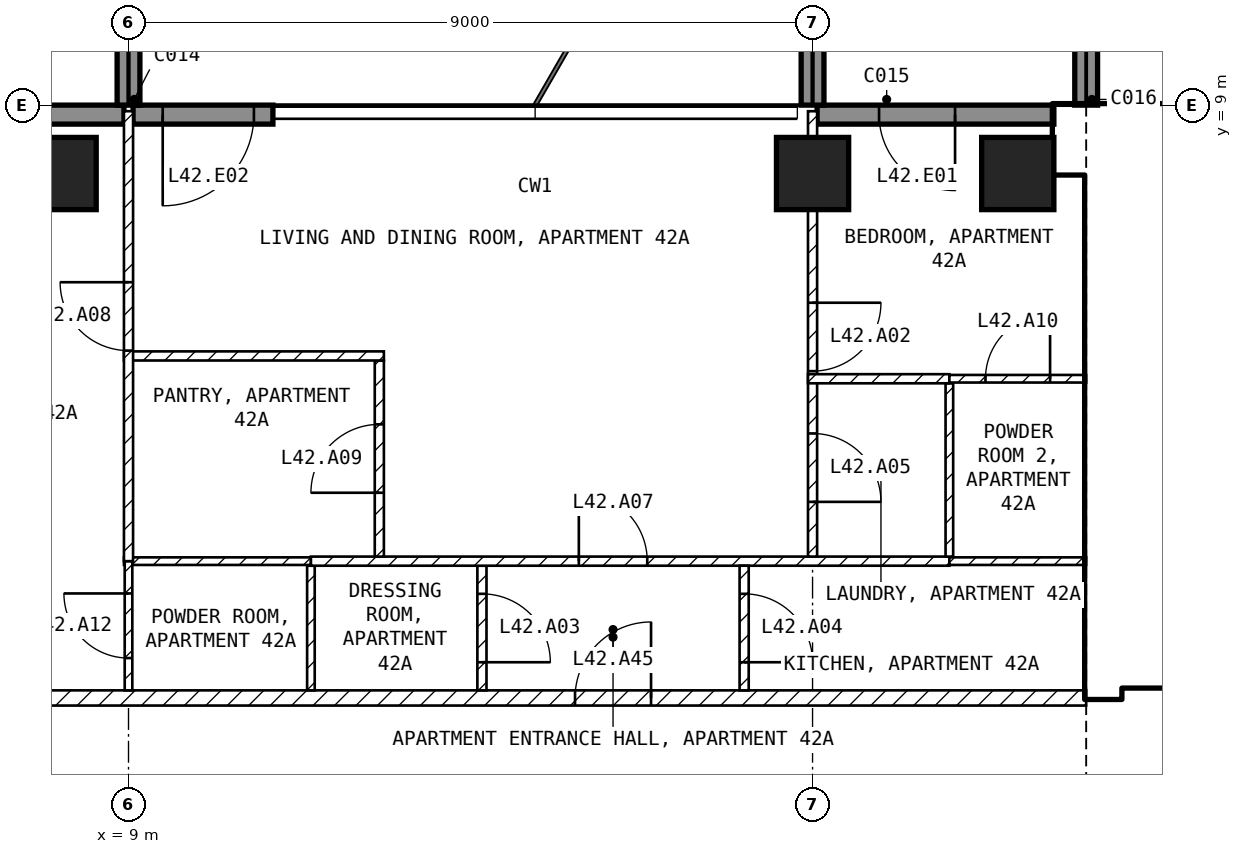
"""IFC4 building model, lengths in metres.
Left out: names, types, materials, properties, quantities, classifications, styles, units other than length and angle.
Written with IfcOpenShell. Run it as: python <this file> out.ifc"""

import sys

from ifc_helpers import new_model, si_unit, direction, frame, frame_2d, origin, origin_2d, place, context, subcontext, project, spatial, rectangle, extrude, element, fill, save


model = new_model("IFC4")
c1 = context("Model", 3, precision=1e-05, world=origin(), true_north=direction((0.0, 1.0)))
c2 = subcontext(c1, "Body", "Model", "MODEL_VIEW")
j1 = project(units=[si_unit("LENGTHUNIT", "METRE"), si_unit("PLANEANGLEUNIT", "RADIAN")], contexts=[c1])
p1 = place(None, origin())
s1 = spatial("IfcSite", under=j1, at=p1, CompositionType="ELEMENT")
p2 = place(p1, origin())
s2 = spatial("IfcBuilding", under=s1, at=p2, CompositionType="ELEMENT")
p3 = place(p2, frame((0.0, 0.0, 173.6)))
s3 = spatial("IfcBuildingStorey", under=s2, at=p3, CompositionType="ELEMENT", Elevation=173.6)
for number, where, z_axis, x_axis in (
    (1, (8.1, 8.1, -0.25), (0.0, 0.0, 1.0), (1.0, 0.0, 0.0)),
    (2, (18.0, 8.1, -0.25), (0.0, 0.0, 1.0), (1.0, 0.0, 0.0)),
    (3, (20.7, 8.1, -0.25), (0.0, 0.0, 1.0), (1.0, 0.0, 0.0)),
):
    element("IfcColumn", number, at=place(p3, frame(where, z_axis=z_axis, x_axis=x_axis)), inside=s3, PredefinedType="COLUMN", context=c2, shape_type="SweptSolid", body=[
        extrude(rectangle(XDim=0.95, YDim=0.95, at=origin_2d()), origin(), (0.0, 0.0, 1.0), 3.5),
    ])
p4 = place(p3, frame((21.175, 8.875, 0.0), z_axis=(0.0, 0.0, 1.0), x_axis=(-1.0, 0.0, 0.0)))
e4 = element("IfcWall", 4, at=p4, inside=s3, PredefinedType="SOLIDWALL", context=c2, shape_type="SweptSolid", body=[
    extrude(rectangle(XDim=3.115, YDim=0.25, at=frame_2d((1.558, 0.0))), origin(), (0.0, 0.0, 1.0), 3.25),
])
p5 = place(p4, frame((1.3, 0.0, 0.0)))
e5 = element("IfcOpeningElement", 5, at=p5, cuts=e4, PredefinedType="OPENING", context=c2, shape_type="SweptSolid", body=[
    extrude(rectangle(XDim=1.0, YDim=2.4, at=frame_2d((0.5, 1.2))), frame((0.0, 0.135, 0.0), z_axis=(0.0, -1.0, 0.0), x_axis=(1.0, 0.0, 0.0)), (0.0, 0.0, 1.0), 0.27),
])
p6 = place(p3, frame((10.9, 8.875, 0.0), z_axis=(0.0, 0.0, 1.0), x_axis=(-1.0, 0.0, 0.0)))
e6 = element("IfcWall", 6, at=p6, inside=s3, PredefinedType="SOLIDWALL", context=c2, shape_type="SweptSolid", body=[
    extrude(rectangle(XDim=1.84, YDim=0.25, at=frame_2d((0.92, 0.0))), origin(), (0.0, 0.0, 1.0), 3.25),
])
p7 = place(p6, frame((0.25, 0.0, 0.0)))
e7 = element("IfcOpeningElement", 7, at=p7, cuts=e6, PredefinedType="OPENING", context=c2, shape_type="SweptSolid", body=[
    extrude(rectangle(XDim=1.2, YDim=2.4, at=frame_2d((0.6, 1.2))), frame((0.0, 0.135, 0.0), z_axis=(0.0, -1.0, 0.0), x_axis=(1.0, 0.0, 0.0)), (0.0, 0.0, 1.0), 0.27),
])
p8 = place(p3, frame((8.94, 8.875, 0.0), z_axis=(0.0, 0.0, 1.0), x_axis=(-1.0, 0.0, 0.0)))
e8 = element("IfcWall", 8, at=p8, inside=s3, PredefinedType="SOLIDWALL", context=c2, shape_type="SweptSolid", body=[
    extrude(rectangle(XDim=3.115, YDim=0.25, at=frame_2d((1.558, 0.0))), origin(), (0.0, 0.0, 1.0), 3.25),
])
p9 = place(p8, frame((1.665, 0.0, 0.0)))
e9 = element("IfcOpeningElement", 9, at=p9, cuts=e8, PredefinedType="OPENING", context=c2, shape_type="SweptSolid", body=[
    extrude(rectangle(XDim=1.2, YDim=2.4, at=frame_2d((0.6, 1.2))), frame((0.0, 0.135, 0.0), z_axis=(0.0, -1.0, 0.0), x_axis=(1.0, 0.0, 0.0)), (0.0, 0.0, 1.0), 0.27),
])
for number, where, z_axis, x_axis in (
    (10, (9.0, 9.0, 0.0), (0.0, 0.0, 1.0), (0.0, 1.0, 0.0)),
    (11, (18.0, 9.0, 0.0), (0.0, 0.0, 1.0), (0.0, 1.0, 0.0)),
    (12, (21.6, 9.0, 0.0), (0.0, 0.0, 1.0), (0.0, 1.0, 0.0)),
):
    element("IfcWall", number, at=place(p3, frame(where, z_axis=z_axis, x_axis=x_axis)), inside=s3, PredefinedType="SOLIDWALL", context=c2, shape_type="SweptSolid", body=[
        extrude(rectangle(XDim=2.7, YDim=0.3, at=frame_2d((1.35, 0.0))), origin(), (0.0, 0.0, 1.0), 3.25),
    ])
p10 = place(p3, frame((21.175, 8.55, 0.0), z_axis=(0.0, 0.0, 1.0), x_axis=(1.0, 0.0, 0.0)))
e13 = element("IfcWall", 13, at=p10, inside=s3, PredefinedType="SHEAR", context=c2, shape_type="SweptSolid", body=[
    extrude(rectangle(XDim=8.425, YDim=0.9, at=frame_2d((4.212, 0.0))), origin(), (0.0, 0.0, 1.0), 3.25),
])
p11 = place(p3, frame((21.825, 1.2, 0.0), z_axis=(0.0, 0.0, 1.0), x_axis=(0.0, 1.0, 0.0)))
e14 = element("IfcWall", 14, at=p11, inside=s3, PredefinedType="SHEAR", context=c2, shape_type="SweptSolid", body=[
    extrude(rectangle(XDim=6.9, YDim=0.45, at=frame_2d((3.45, 0.0))), origin(), (0.0, 0.0, 1.0), 3.25),
])
p12 = place(p3, frame((22.05, 1.45, 0.0), z_axis=(0.0, 0.0, 1.0), x_axis=(1.0, 0.0, 0.0)))
e15 = element("IfcWall", 15, at=p12, inside=s3, PredefinedType="SOLIDWALL", context=c2, shape_type="SweptSolid", body=[
    extrude(rectangle(XDim=11.15, YDim=0.2, at=frame_2d((5.575, 0.0))), origin(), (0.0, 0.0, 1.0), 3.25),
])
p13 = place(p12, frame((0.75, 0.0, 0.0)))
e16 = element("IfcOpeningElement", 16, at=p13, cuts=e15, PredefinedType="OPENING", context=c2, shape_type="SweptSolid", body=[
    extrude(rectangle(XDim=1.0, YDim=2.1, at=frame_2d((0.5, 1.05))), frame((0.0, 0.11, 0.0), z_axis=(0.0, -1.0, 0.0), x_axis=(1.0, 0.0, 0.0)), (0.0, 0.0, 1.0), 0.22),
])
p14 = place(p12, frame((3.25, 0.0, 0.0)))
e17 = element("IfcOpeningElement", 17, at=p14, cuts=e15, PredefinedType="OPENING", context=c2, shape_type="SweptSolid", body=[
    extrude(rectangle(XDim=1.0, YDim=2.1, at=frame_2d((0.5, 1.05))), frame((0.0, 0.11, 0.0), z_axis=(0.0, -1.0, 0.0), x_axis=(1.0, 0.0, 0.0)), (0.0, 0.0, 1.0), 0.22),
])
p15 = place(p12, frame((9.15, 0.0, 0.0)))
e18 = element("IfcOpeningElement", 18, at=p15, cuts=e15, PredefinedType="OPENING", context=c2, shape_type="SweptSolid", body=[
    extrude(rectangle(XDim=0.9, YDim=2.1, at=frame_2d((0.45, 1.05))), frame((0.0, 0.11, 0.0), z_axis=(0.0, -1.0, 0.0), x_axis=(1.0, 0.0, 0.0)), (0.0, 0.0, 1.0), 0.22),
])
p16 = place(p3, frame((22.05, 5.15, 0.0), z_axis=(0.0, 0.0, 1.0), x_axis=(1.0, 0.0, 0.0)))
e19 = element("IfcWall", 19, at=p16, inside=s3, PredefinedType="SOLIDWALL", context=c2, shape_type="SweptSolid", body=[
    extrude(rectangle(XDim=6.3, YDim=0.2, at=frame_2d((3.15, 0.0))), origin(), (0.0, 0.0, 1.0), 3.25),
])
p17 = place(p16, frame((0.2, 0.0, 0.0)))
e20 = element("IfcOpeningElement", 20, at=p17, cuts=e19, PredefinedType="OPENING", context=c2, shape_type="SweptSolid", body=[
    extrude(rectangle(XDim=1.0, YDim=2.1, at=frame_2d((0.5, 1.05))), frame((0.0, 0.11, 0.0), z_axis=(0.0, -1.0, 0.0), x_axis=(1.0, 0.0, 0.0)), (0.0, 0.0, 1.0), 0.22),
])
p18 = place(p3, frame((4.4, 1.2, 0.0), z_axis=(0.0, 0.0, 1.0), x_axis=(1.0, 0.0, 0.0)))
e21 = element("IfcWall", 21, at=p18, inside=s3, PredefinedType="PARTITIONING", context=c2, shape_type="SweptSolid", body=[
    extrude(rectangle(XDim=17.2, YDim=0.2, at=frame_2d((8.6, 0.0))), origin(), (0.0, 0.0, 1.0), 3.25),
])
p19 = place(p18, frame((10.475, 0.0, 0.0)))
e22 = element("IfcOpeningElement", 22, at=p19, cuts=e21, PredefinedType="OPENING", context=c2, shape_type="SweptSolid", body=[
    extrude(rectangle(XDim=1.0, YDim=2.1, at=frame_2d((0.5, 1.05))), frame((0.0, 0.11, 0.0), z_axis=(0.0, -1.0, 0.0), x_axis=(1.0, 0.0, 0.0)), (0.0, 0.0, 1.0), 0.22),
])
p20 = place(p3, frame((11.4, 2.94, 0.0), z_axis=(0.0, 0.0, 1.0), x_axis=(0.0, -1.0, 0.0)))
e23 = element("IfcWall", 23, at=p20, inside=s3, PredefinedType="PARTITIONING", context=c2, shape_type="SweptSolid", body=[
    extrude(rectangle(XDim=1.64, YDim=0.1, at=frame_2d((0.82, 0.0))), origin(), (0.0, 0.0, 1.0), 3.25),
])
p21 = place(p3, frame((8.94, 3.0, 0.0), z_axis=(0.0, 0.0, 1.0), x_axis=(1.0, 0.0, 0.0)))
e24 = element("IfcWall", 24, at=p21, inside=s3, PredefinedType="PARTITIONING", context=c2, shape_type="SweptSolid", body=[
    extrude(rectangle(XDim=2.46, YDim=0.1, at=frame_2d((1.23, 0.0))), origin(), (0.0, 0.0, 1.0), 3.25),
])
p22 = place(p3, frame((9.0, 1.3, 0.0), z_axis=(0.0, 0.0, 1.0), x_axis=(0.0, 1.0, 0.0)))
e25 = element("IfcWall", 25, at=p22, inside=s3, PredefinedType="PARTITIONING", context=c2, shape_type="SweptSolid", body=[
    extrude(rectangle(XDim=1.7, YDim=0.1, at=frame_2d((0.85, 0.0))), origin(), (0.0, 0.0, 1.0), 3.25),
])
p23 = place(p22, frame((0.425, 0.0, 0.0)))
e26 = element("IfcOpeningElement", 26, at=p23, cuts=e25, PredefinedType="OPENING", context=c2, shape_type="SweptSolid", body=[
    extrude(rectangle(XDim=0.85, YDim=2.1, at=frame_2d((0.425, 1.05))), frame((0.0, 0.06, 0.0), z_axis=(0.0, -1.0, 0.0), x_axis=(1.0, 0.0, 0.0)), (0.0, 0.0, 1.0), 0.12),
])
p24 = place(p3, frame((13.65, 2.94, 0.0), z_axis=(0.0, 0.0, 1.0), x_axis=(0.0, -1.0, 0.0)))
e27 = element("IfcWall", 27, at=p24, inside=s3, PredefinedType="PARTITIONING", context=c2, shape_type="SweptSolid", body=[
    extrude(rectangle(XDim=1.64, YDim=0.12, at=frame_2d((0.82, 0.0))), origin(), (0.0, 0.0, 1.0), 3.25),
])
p25 = place(p24, frame((0.37, 0.0, 0.0)))
e28 = element("IfcOpeningElement", 28, at=p25, cuts=e27, PredefinedType="OPENING", context=c2, shape_type="SweptSolid", body=[
    extrude(rectangle(XDim=0.9, YDim=2.1, at=frame_2d((0.45, 1.05))), frame((0.0, 0.07, 0.0), z_axis=(0.0, -1.0, 0.0), x_axis=(1.0, 0.0, 0.0)), (0.0, 0.0, 1.0), 0.14),
])
p26 = place(p3, frame((11.4, 3.0, 0.0), z_axis=(0.0, 0.0, 1.0), x_axis=(1.0, 0.0, 0.0)))
e29 = element("IfcWall", 29, at=p26, inside=s3, PredefinedType="PARTITIONING", context=c2, shape_type="SweptSolid", body=[
    extrude(rectangle(XDim=8.4, YDim=0.12, at=frame_2d((4.2, 0.0))), origin(), (0.0, 0.0, 1.0), 3.25),
])
p27 = place(p26, frame((3.525, 0.0, 0.0)))
e30 = element("IfcOpeningElement", 30, at=p27, cuts=e29, PredefinedType="OPENING", context=c2, shape_type="SweptSolid", body=[
    extrude(rectangle(XDim=0.9, YDim=2.1, at=frame_2d((0.45, 1.05))), frame((0.0, 0.07, 0.0), z_axis=(0.0, -1.0, 0.0), x_axis=(1.0, 0.0, 0.0)), (0.0, 0.0, 1.0), 0.14),
])
p28 = place(p3, frame((17.1, 2.94, 0.0), z_axis=(0.0, 0.0, 1.0), x_axis=(0.0, -1.0, 0.0)))
e31 = element("IfcWall", 31, at=p28, inside=s3, PredefinedType="PARTITIONING", context=c2, shape_type="SweptSolid", body=[
    extrude(rectangle(XDim=1.64, YDim=0.12, at=frame_2d((0.82, 0.0))), origin(), (0.0, 0.0, 1.0), 3.25),
])
p29 = place(p28, frame((0.37, 0.0, 0.0)))
e32 = element("IfcOpeningElement", 32, at=p29, cuts=e31, PredefinedType="OPENING", context=c2, shape_type="SweptSolid", body=[
    extrude(rectangle(XDim=0.9, YDim=2.1, at=frame_2d((0.45, 1.05))), frame((0.0, 0.07, 0.0), z_axis=(0.0, -1.0, 0.0), x_axis=(1.0, 0.0, 0.0)), (0.0, 0.0, 1.0), 0.14),
])
p30 = place(p3, frame((19.8, 3.0, 0.0), z_axis=(0.0, 0.0, 1.0), x_axis=(1.0, 0.0, 0.0)))
e33 = element("IfcWall", 33, at=p30, inside=s3, PredefinedType="PARTITIONING", context=c2, shape_type="SweptSolid", body=[
    extrude(rectangle(XDim=1.8, YDim=0.1, at=frame_2d((0.9, 0.0))), origin(), (0.0, 0.0, 1.0), 3.25),
])
p31 = place(p3, frame((12.3, 3.06, 0.0), z_axis=(0.0, 0.0, 1.0), x_axis=(0.0, 1.0, 0.0)))
e34 = element("IfcWall", 34, at=p31, inside=s3, PredefinedType="PARTITIONING", context=c2, shape_type="SweptSolid", body=[
    extrude(rectangle(XDim=2.58, YDim=0.12, at=frame_2d((1.29, 0.0))), origin(), (0.0, 0.0, 1.0), 3.25),
])
p32 = place(p31, frame((0.84, 0.0, 0.0)))
e35 = element("IfcOpeningElement", 35, at=p32, cuts=e34, PredefinedType="OPENING", context=c2, shape_type="SweptSolid", body=[
    extrude(rectangle(XDim=0.9, YDim=2.1, at=frame_2d((0.45, 1.05))), frame((0.0, 0.07, 0.0), z_axis=(0.0, -1.0, 0.0), x_axis=(1.0, 0.0, 0.0)), (0.0, 0.0, 1.0), 0.14),
])
p33 = place(p3, frame((12.36, 5.7, 0.0), z_axis=(0.0, 0.0, 1.0), x_axis=(-1.0, 0.0, 0.0)))
e36 = element("IfcWall", 36, at=p33, inside=s3, PredefinedType="PARTITIONING", context=c2, shape_type="SweptSolid", body=[
    extrude(rectangle(XDim=3.42, YDim=0.12, at=frame_2d((1.71, 0.0))), origin(), (0.0, 0.0, 1.0), 3.25),
])
p34 = place(p3, frame((18.0, 8.92, 0.0), z_axis=(0.0, 0.0, 1.0), x_axis=(0.0, -1.0, 0.0)))
e37 = element("IfcWall", 37, at=p34, inside=s3, PredefinedType="PARTITIONING", context=c2, shape_type="SweptSolid", body=[
    extrude(rectangle(XDim=5.86, YDim=0.12, at=frame_2d((2.93, 0.0))), origin(), (0.0, 0.0, 1.0), 2.48),
])
p35 = place(p34, frame((2.52, 0.0, 0.0)))
e38 = element("IfcOpeningElement", 38, at=p35, cuts=e37, PredefinedType="OPENING", context=c2, shape_type="SweptSolid", body=[
    extrude(rectangle(XDim=0.9, YDim=2.1, at=frame_2d((0.45, 1.05))), frame((0.0, 0.07, 0.0), z_axis=(0.0, -1.0, 0.0), x_axis=(1.0, 0.0, 0.0)), (0.0, 0.0, 1.0), 0.14),
])
p36 = place(p34, frame((4.24, 0.0, 0.0)))
e39 = element("IfcOpeningElement", 39, at=p36, cuts=e37, PredefinedType="OPENING", context=c2, shape_type="SweptSolid", body=[
    extrude(rectangle(XDim=0.9, YDim=2.1, at=frame_2d((0.45, 1.05))), frame((0.0, 0.07, 0.0), z_axis=(0.0, -1.0, 0.0), x_axis=(1.0, 0.0, 0.0)), (0.0, 0.0, 1.0), 0.14),
])
p37 = place(p3, frame((9.0, 3.0, 0.0), z_axis=(0.0, 0.0, 1.0), x_axis=(0.0, 1.0, 0.0)))
e40 = element("IfcWall", 40, at=p37, inside=s3, PredefinedType="PARTITIONING", context=c2, shape_type="SweptSolid", body=[
    extrude(rectangle(XDim=5.92, YDim=0.12, at=frame_2d((2.96, 0.0))), origin(), (0.0, 0.0, 1.0), 3.25),
])
p38 = place(p37, frame((2.77, 0.0, 0.0)))
e41 = element("IfcOpeningElement", 41, at=p38, cuts=e40, PredefinedType="OPENING", context=c2, shape_type="SweptSolid", body=[
    extrude(rectangle(XDim=0.9, YDim=2.1, at=frame_2d((0.45, 1.05))), frame((0.0, 0.07, 0.0), z_axis=(0.0, -1.0, 0.0), x_axis=(1.0, 0.0, 0.0)), (0.0, 0.0, 1.0), 0.14),
])
p39 = place(p3, frame((19.8, 5.34, 0.0), z_axis=(0.0, 0.0, 1.0), x_axis=(0.0, -1.0, 0.0)))
e42 = element("IfcWall", 42, at=p39, inside=s3, PredefinedType="PARTITIONING", context=c2, shape_type="SweptSolid", body=[
    extrude(rectangle(XDim=2.28, YDim=0.1, at=frame_2d((1.14, 0.0))), origin(), (0.0, 0.0, 1.0), 3.25),
])
p40 = place(p3, frame((17.94, 5.4, 0.0), z_axis=(0.0, 0.0, 1.0), x_axis=(1.0, 0.0, 0.0)))
e43 = element("IfcWall", 43, at=p40, inside=s3, PredefinedType="PARTITIONING", context=c2, shape_type="SweptSolid", body=[
    extrude(rectangle(XDim=1.86, YDim=0.12, at=frame_2d((0.93, 0.0))), origin(), (0.0, 0.0, 1.0), 3.25),
])
p41 = place(p3, frame((19.8, 5.4, 0.0), z_axis=(0.0, 0.0, 1.0), x_axis=(1.0, 0.0, 0.0)))
e44 = element("IfcWall", 44, at=p41, inside=s3, PredefinedType="PARTITIONING", context=c2, shape_type="SweptSolid", body=[
    extrude(rectangle(XDim=1.8, YDim=0.1, at=frame_2d((0.9, 0.0))), origin(), (0.0, 0.0, 1.0), 3.25),
])
p42 = place(p41, frame((0.475, 0.0, 0.0)))
e45 = element("IfcOpeningElement", 45, at=p42, cuts=e44, PredefinedType="OPENING", context=c2, shape_type="SweptSolid", body=[
    extrude(rectangle(XDim=0.85, YDim=2.1, at=frame_2d((0.425, 1.05))), frame((0.0, 0.06, 0.0), z_axis=(0.0, -1.0, 0.0), x_axis=(1.0, 0.0, 0.0)), (0.0, 0.0, 1.0), 0.12),
])
p43 = place(p5, origin())
e46 = element("IfcDoor", 46, at=p43, inside=s3, OperationType="SINGLE_SWING_LEFT", PredefinedType="DOOR", context=c2, shape_type="SweptSolid", body=[
    extrude(rectangle(XDim=1.0, YDim=2.4, at=frame_2d((0.5, 1.2))), frame((0.0, 0.025, 0.0), z_axis=(0.0, -1.0, 0.0), x_axis=(1.0, 0.0, 0.0)), (0.0, 0.0, 1.0), 0.05),
])
fill(e5, e46)
p44 = place(p7, origin())
e47 = element("IfcDoor", 47, at=p44, inside=s3, OperationType="SINGLE_SWING_RIGHT", PredefinedType="DOOR", context=c2, shape_type="SweptSolid", body=[
    extrude(rectangle(XDim=1.2, YDim=2.4, at=frame_2d((0.6, 1.2))), frame((0.0, 0.025, 0.0), z_axis=(0.0, -1.0, 0.0), x_axis=(1.0, 0.0, 0.0)), (0.0, 0.0, 1.0), 0.05),
])
fill(e7, e47)
p45 = place(p17, origin())
e48 = element("IfcDoor", 48, at=p45, inside=s3, OperationType="SINGLE_SWING_LEFT", PredefinedType="DOOR", context=c2, shape_type="SweptSolid", body=[
    extrude(rectangle(XDim=1.0, YDim=2.1, at=frame_2d((0.5, 1.05))), frame((0.0, 0.025, 0.0), z_axis=(0.0, -1.0, 0.0), x_axis=(1.0, 0.0, 0.0)), (0.0, 0.0, 1.0), 0.05),
])
fill(e20, e48)
p46 = place(p35, origin())
e49 = element("IfcDoor", 49, at=p46, inside=s3, OperationType="SINGLE_SWING_LEFT", PredefinedType="DOOR", context=c2, shape_type="SweptSolid", body=[
    extrude(rectangle(XDim=0.9, YDim=2.1, at=frame_2d((0.45, 1.05))), frame((0.0, 0.025, 0.0), z_axis=(0.0, -1.0, 0.0), x_axis=(1.0, 0.0, 0.0)), (0.0, 0.0, 1.0), 0.05),
])
fill(e38, e49)
p47 = place(p25, origin())
e50 = element("IfcDoor", 50, at=p47, inside=s3, OperationType="SINGLE_SWING_RIGHT", PredefinedType="DOOR", context=c2, shape_type="SweptSolid", body=[
    extrude(rectangle(XDim=0.9, YDim=2.1, at=frame_2d((0.45, 1.05))), frame((0.0, 0.025, 0.0), z_axis=(0.0, -1.0, 0.0), x_axis=(1.0, 0.0, 0.0)), (0.0, 0.0, 1.0), 0.05),
])
fill(e28, e50)
p48 = place(p29, origin())
e51 = element("IfcDoor", 51, at=p48, inside=s3, OperationType="SINGLE_SWING_RIGHT", PredefinedType="DOOR", context=c2, shape_type="SweptSolid", body=[
    extrude(rectangle(XDim=0.9, YDim=2.1, at=frame_2d((0.45, 1.05))), frame((0.0, 0.025, 0.0), z_axis=(0.0, -1.0, 0.0), x_axis=(1.0, 0.0, 0.0)), (0.0, 0.0, 1.0), 0.05),
])
fill(e32, e51)
p49 = place(p36, origin())
e52 = element("IfcDoor", 52, at=p49, inside=s3, OperationType="SINGLE_SWING_RIGHT", PredefinedType="DOOR", context=c2, shape_type="SweptSolid", body=[
    extrude(rectangle(XDim=0.9, YDim=2.1, at=frame_2d((0.45, 1.05))), frame((0.0, 0.025, 0.0), z_axis=(0.0, -1.0, 0.0), x_axis=(1.0, 0.0, 0.0)), (0.0, 0.0, 1.0), 0.05),
])
fill(e39, e52)
p50 = place(p27, origin())
e53 = element("IfcDoor", 53, at=p50, inside=s3, OperationType="SINGLE_SWING_LEFT", PredefinedType="DOOR", context=c2, shape_type="SweptSolid", body=[
    extrude(rectangle(XDim=0.9, YDim=2.1, at=frame_2d((0.45, 1.05))), frame((0.0, 0.025, 0.0), z_axis=(0.0, -1.0, 0.0), x_axis=(1.0, 0.0, 0.0)), (0.0, 0.0, 1.0), 0.05),
])
fill(e30, e53)
p51 = place(p38, origin())
e54 = element("IfcDoor", 54, at=p51, inside=s3, OperationType="SINGLE_SWING_RIGHT", PredefinedType="DOOR", context=c2, shape_type="SweptSolid", body=[
    extrude(rectangle(XDim=0.9, YDim=2.1, at=frame_2d((0.45, 1.05))), frame((0.0, 0.025, 0.0), z_axis=(0.0, -1.0, 0.0), x_axis=(1.0, 0.0, 0.0)), (0.0, 0.0, 1.0), 0.05),
])
fill(e41, e54)
p52 = place(p32, origin())
e55 = element("IfcDoor", 55, at=p52, inside=s3, OperationType="SINGLE_SWING_LEFT", PredefinedType="DOOR", context=c2, shape_type="SweptSolid", body=[
    extrude(rectangle(XDim=0.9, YDim=2.1, at=frame_2d((0.45, 1.05))), frame((0.0, 0.025, 0.0), z_axis=(0.0, -1.0, 0.0), x_axis=(1.0, 0.0, 0.0)), (0.0, 0.0, 1.0), 0.05),
])
fill(e35, e55)
p53 = place(p42, origin())
e56 = element("IfcDoor", 56, at=p53, inside=s3, OperationType="SINGLE_SWING_RIGHT", PredefinedType="DOOR", context=c2, shape_type="SweptSolid", body=[
    extrude(rectangle(XDim=0.85, YDim=2.1, at=frame_2d((0.425, 1.05))), frame((0.0, 0.025, 0.0), z_axis=(0.0, -1.0, 0.0), x_axis=(1.0, 0.0, 0.0)), (0.0, 0.0, 1.0), 0.05),
])
fill(e45, e56)
p54 = place(p23, origin())
e57 = element("IfcDoor", 57, at=p54, inside=s3, OperationType="SINGLE_SWING_RIGHT", PredefinedType="DOOR", context=c2, shape_type="SweptSolid", body=[
    extrude(rectangle(XDim=0.85, YDim=2.1, at=frame_2d((0.425, 1.05))), frame((0.0, 0.025, 0.0), z_axis=(0.0, -1.0, 0.0), x_axis=(1.0, 0.0, 0.0)), (0.0, 0.0, 1.0), 0.05),
])
fill(e26, e57)
p55 = place(p19, origin())
e58 = element("IfcDoor", 58, at=p55, inside=s3, OperationType="SINGLE_SWING_RIGHT", PredefinedType="DOOR", context=c2, shape_type="SweptSolid", body=[
    extrude(rectangle(XDim=1.0, YDim=2.1, at=frame_2d((0.5, 1.05))), frame((0.0, 0.025, 0.0), z_axis=(0.0, -1.0, 0.0), x_axis=(1.0, 0.0, 0.0)), (0.0, 0.0, 1.0), 0.05),
])
fill(e22, e58)
save(model, sys.argv[1])
